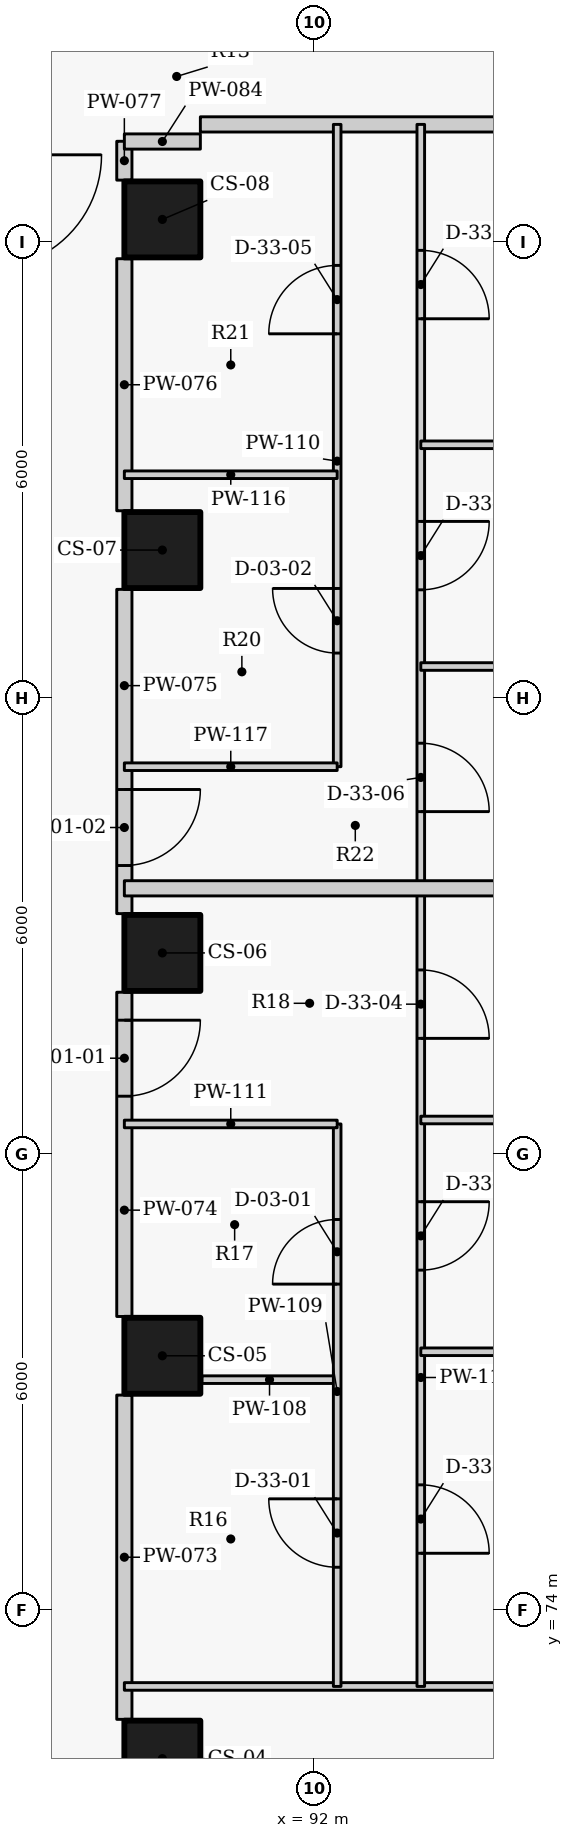
"""IFC4 building model, lengths in metres.
Left out: names, types, materials, properties, quantities, classifications, styles, units other than length and angle.
Written with IfcOpenShell. Run it as: python <this file> out.ifc"""

import sys

from ifc_helpers import new_model, si_unit, direction, frame, frame_2d, origin, origin_2d, place, context, subcontext, project, spatial, rectangle, extrude, element, fill, save


model = new_model("IFC4")
c1 = context("Model", 3, precision=1e-05, world=origin(), true_north=direction((0.0, 1.0)))
c2 = subcontext(c1, "Body", "Model", "MODEL_VIEW")
j1 = project(units=[si_unit("LENGTHUNIT", "METRE"), si_unit("PLANEANGLEUNIT", "RADIAN")], contexts=[c1])
p1 = place(None, origin())
s1 = spatial("IfcSite", under=j1, at=p1, CompositionType="ELEMENT")
p2 = place(p1, origin())
s2 = spatial("IfcBuilding", under=s1, at=p2, CompositionType="ELEMENT")
p3 = place(p2, frame((0.0, 0.0, 77.7)))
s3 = spatial("IfcBuildingStorey", under=s2, at=p3, CompositionType="ELEMENT", Elevation=77.7)
for number, where, z_axis, x_axis in (
    (1, (90.0, 72.05, 0.0), (0.0, 0.0, 1.0), (0.0, 1.0, 0.0)),
    (2, (90.0, 77.35, 0.0), (0.0, 0.0, 1.0), (0.0, 1.0, 0.0)),
    (3, (90.0, 82.65, 0.0), (0.0, 0.0, 1.0), (0.0, 1.0, 0.0)),
    (4, (90.0, 87.95, 0.0), (0.0, 0.0, 1.0), (0.0, 1.0, 0.0)),
    (5, (90.0, 92.3, 0.0), (0.0, 0.0, 1.0), (0.0, 1.0, 0.0)),
):
    element("IfcColumn", number, at=place(p3, frame(where, z_axis=z_axis, x_axis=x_axis)), inside=s3, PredefinedType="COLUMN", context=c2, shape_type="SweptSolid", body=[
        extrude(rectangle(XDim=1.0, YDim=1.0, at=origin_2d()), origin(), (0.0, 0.0, 1.0), 3.3),
    ])
p4 = place(p3, frame((89.5, 72.567, 0.0), z_axis=(0.0, 0.0, 1.0), x_axis=(0.0, 1.0, 0.0)))
e6 = element("IfcWall", 6, at=p4, inside=s3, PredefinedType="PARTITIONING", context=c2, shape_type="SweptSolid", body=[
    extrude(rectangle(XDim=4.266, YDim=0.2, at=frame_2d((2.133, 0.0))), origin(), (0.0, 0.0, 1.0), 3.025),
])
p5 = place(p3, frame((89.5, 82.133, 0.0), z_axis=(0.0, 0.0, 1.0), x_axis=(0.0, -1.0, 0.0)))
e7 = element("IfcWall", 7, at=p5, inside=s3, PredefinedType="PARTITIONING", context=c2, shape_type="SweptSolid", body=[
    extrude(rectangle(XDim=4.266, YDim=0.2, at=frame_2d((2.133, 0.0))), origin(), (0.0, 0.0, 1.0), 3.025),
])
p6 = place(p5, frame((0.368, 0.0, 0.0)))
e8 = element("IfcOpeningElement", 8, at=p6, cuts=e7, PredefinedType="OPENING", context=c2, shape_type="SweptSolid", body=[
    extrude(rectangle(XDim=1.0, YDim=2.1, at=frame_2d((0.5, 1.05))), frame((0.0, 0.11, 0.0), z_axis=(0.0, -1.0, 0.0), x_axis=(1.0, 0.0, 0.0)), (0.0, 0.0, 1.0), 0.22),
])
p7 = place(p3, frame((89.5, 87.433, 0.0), z_axis=(0.0, 0.0, 1.0), x_axis=(0.0, -1.0, 0.0)))
e9 = element("IfcWall", 9, at=p7, inside=s3, PredefinedType="PARTITIONING", context=c2, shape_type="SweptSolid", body=[
    extrude(rectangle(XDim=4.266, YDim=0.2, at=frame_2d((2.133, 0.0))), origin(), (0.0, 0.0, 1.0), 3.025),
])
p8 = place(p7, frame((2.633, 0.0, 0.0)))
e10 = element("IfcOpeningElement", 10, at=p8, cuts=e9, PredefinedType="OPENING", context=c2, shape_type="SweptSolid", body=[
    extrude(rectangle(XDim=1.0, YDim=2.1, at=frame_2d((0.5, 1.05))), frame((0.0, 0.11, 0.0), z_axis=(0.0, -1.0, 0.0), x_axis=(1.0, 0.0, 0.0)), (0.0, 0.0, 1.0), 0.22),
])
p9 = place(p3, frame((89.5, 88.467, 0.0), z_axis=(0.0, 0.0, 1.0), x_axis=(0.0, 1.0, 0.0)))
e11 = element("IfcWall", 11, at=p9, inside=s3, PredefinedType="PARTITIONING", context=c2, shape_type="SweptSolid", body=[
    extrude(rectangle(XDim=3.316, YDim=0.2, at=frame_2d((1.658, 0.0))), origin(), (0.0, 0.0, 1.0), 3.025),
])
p10 = place(p3, frame((89.5, 92.817, 0.0), z_axis=(0.0, 0.0, 1.0), x_axis=(0.0, 1.0, 0.0)))
e12 = element("IfcWall", 12, at=p10, inside=s3, PredefinedType="PARTITIONING", context=c2, shape_type="SweptSolid", body=[
    extrude(rectangle(XDim=0.511, YDim=0.2, at=frame_2d((0.255, 0.0))), origin(), (0.0, 0.0, 1.0), 3.025),
])
p11 = place(p3, frame((90.5, 93.55, 0.0), z_axis=(0.0, 0.0, 1.0), x_axis=(1.0, 0.0, 0.0)))
e13 = element("IfcWall", 13, at=p11, inside=s3, PredefinedType="PARTITIONING", context=c2, shape_type="SweptSolid", body=[
    extrude(rectangle(XDim=9.043, YDim=0.2, at=frame_2d((4.521, 0.0))), origin(), (0.0, 0.0, 1.0), 2.405),
])
p12 = place(p3, frame((89.5, 93.325, 0.0), z_axis=(0.0, 0.0, 1.0), x_axis=(1.0, 0.0, 0.0)))
e14 = element("IfcWall", 14, at=p12, inside=s3, PredefinedType="PARTITIONING", context=c2, shape_type="SweptSolid", body=[
    extrude(rectangle(XDim=1.0, YDim=0.2, at=frame_2d((0.5, 0.0))), origin(), (0.0, 0.0, 1.0), 2.505),
])
p13 = place(p3, frame((89.5, 73.0, 0.0), z_axis=(0.0, 0.0, 1.0), x_axis=(1.0, 0.0, 0.0)))
e15 = element("IfcWall", 15, at=p13, inside=s3, PredefinedType="PARTITIONING", context=c2, shape_type="SweptSolid", body=[
    extrude(rectangle(XDim=13.109, YDim=0.1, at=frame_2d((6.555, 0.0))), origin(), (0.0, 0.0, 1.0), 2.505),
])
p14 = place(p3, frame((90.52, 77.036, 0.0), z_axis=(0.0, 0.0, 1.0), x_axis=(1.0, 0.0, 0.0)))
e16 = element("IfcWall", 16, at=p14, inside=s3, PredefinedType="PARTITIONING", context=c2, shape_type="SweptSolid", body=[
    extrude(rectangle(XDim=1.78, YDim=0.1, at=frame_2d((0.89, 0.0))), origin(), (0.0, 0.0, 1.0), 3.025),
])
p15 = place(p3, frame((92.3, 73.0, 0.0), z_axis=(0.0, 0.0, 1.0), x_axis=(0.0, 1.0, 0.0)))
e17 = element("IfcWall", 17, at=p15, inside=s3, PredefinedType="PARTITIONING", context=c2, shape_type="SweptSolid", body=[
    extrude(rectangle(XDim=7.4, YDim=0.1, at=frame_2d((3.7, 0.0))), origin(), (0.0, 0.0, 1.0), 3.025),
])
p16 = place(p15, frame((1.568, 0.0, 0.0)))
e18 = element("IfcOpeningElement", 18, at=p16, cuts=e17, PredefinedType="OPENING", context=c2, shape_type="SweptSolid", body=[
    extrude(rectangle(XDim=0.9, YDim=2.1, at=frame_2d((0.45, 1.05))), frame((0.0, 0.06, 0.0), z_axis=(0.0, -1.0, 0.0), x_axis=(1.0, 0.0, 0.0)), (0.0, 0.0, 1.0), 0.12),
])
p17 = place(p15, frame((5.293, 0.0, 0.0)))
e19 = element("IfcOpeningElement", 19, at=p17, cuts=e17, PredefinedType="OPENING", context=c2, shape_type="SweptSolid", body=[
    extrude(rectangle(XDim=0.85, YDim=2.1, at=frame_2d((0.425, 1.05))), frame((0.0, 0.06, 0.0), z_axis=(0.0, -1.0, 0.0), x_axis=(1.0, 0.0, 0.0)), (0.0, 0.0, 1.0), 0.12),
])
p18 = place(p3, frame((92.3, 85.1, 0.0), z_axis=(0.0, 0.0, 1.0), x_axis=(0.0, 1.0, 0.0)))
e20 = element("IfcWall", 20, at=p18, inside=s3, PredefinedType="PARTITIONING", context=c2, shape_type="SweptSolid", body=[
    extrude(rectangle(XDim=8.45, YDim=0.1, at=frame_2d((4.225, 0.0))), origin(), (0.0, 0.0, 1.0), 3.025),
])
p19 = place(p18, frame((1.495, 0.0, 0.0)))
e21 = element("IfcOpeningElement", 21, at=p19, cuts=e20, PredefinedType="OPENING", context=c2, shape_type="SweptSolid", body=[
    extrude(rectangle(XDim=0.85, YDim=2.1, at=frame_2d((0.425, 1.05))), frame((0.0, 0.06, 0.0), z_axis=(0.0, -1.0, 0.0), x_axis=(1.0, 0.0, 0.0)), (0.0, 0.0, 1.0), 0.12),
])
p20 = place(p18, frame((5.695, 0.0, 0.0)))
e22 = element("IfcOpeningElement", 22, at=p20, cuts=e20, PredefinedType="OPENING", context=c2, shape_type="SweptSolid", body=[
    extrude(rectangle(XDim=0.9, YDim=2.1, at=frame_2d((0.45, 1.05))), frame((0.0, 0.06, 0.0), z_axis=(0.0, -1.0, 0.0), x_axis=(1.0, 0.0, 0.0)), (0.0, 0.0, 1.0), 0.12),
])
p21 = place(p3, frame((89.5, 80.4, 0.0), z_axis=(0.0, 0.0, 1.0), x_axis=(1.0, 0.0, 0.0)))
e23 = element("IfcWall", 23, at=p21, inside=s3, PredefinedType="PARTITIONING", context=c2, shape_type="SweptSolid", body=[
    extrude(rectangle(XDim=2.8, YDim=0.1, at=frame_2d((1.4, 0.0))), origin(), (0.0, 0.0, 1.0), 2.505),
])
p22 = place(p3, frame((93.4, 93.55, 0.0), z_axis=(0.0, 0.0, 1.0), x_axis=(0.0, -1.0, 0.0)))
e24 = element("IfcWall", 24, at=p22, inside=s3, PredefinedType="PARTITIONING", context=c2, shape_type="SweptSolid", body=[
    extrude(rectangle(XDim=20.55, YDim=0.1, at=frame_2d((10.275, 0.0))), origin(), (0.0, 0.0, 1.0), 3.025),
])
p23 = place(p22, frame((17.898, 0.0, 0.0)))
e25 = element("IfcOpeningElement", 25, at=p23, cuts=e24, PredefinedType="OPENING", context=c2, shape_type="SweptSolid", body=[
    extrude(rectangle(XDim=0.9, YDim=2.1, at=frame_2d((0.45, 1.05))), frame((0.0, 0.06, 0.0), z_axis=(0.0, -1.0, 0.0), x_axis=(1.0, 0.0, 0.0)), (0.0, 0.0, 1.0), 0.12),
])
p24 = place(p22, frame((14.173, 0.0, 0.0)))
e26 = element("IfcOpeningElement", 26, at=p24, cuts=e24, PredefinedType="OPENING", context=c2, shape_type="SweptSolid", body=[
    extrude(rectangle(XDim=0.9, YDim=2.1, at=frame_2d((0.45, 1.05))), frame((0.0, 0.06, 0.0), z_axis=(0.0, -1.0, 0.0), x_axis=(1.0, 0.0, 0.0)), (0.0, 0.0, 1.0), 0.12),
])
p25 = place(p22, frame((11.124, 0.0, 0.0)))
e27 = element("IfcOpeningElement", 27, at=p25, cuts=e24, PredefinedType="OPENING", context=c2, shape_type="SweptSolid", body=[
    extrude(rectangle(XDim=0.9, YDim=2.1, at=frame_2d((0.45, 1.05))), frame((0.0, 0.06, 0.0), z_axis=(0.0, -1.0, 0.0), x_axis=(1.0, 0.0, 0.0)), (0.0, 0.0, 1.0), 0.12),
])
p26 = place(p22, frame((8.141, 0.0, 0.0)))
e28 = element("IfcOpeningElement", 28, at=p26, cuts=e24, PredefinedType="OPENING", context=c2, shape_type="SweptSolid", body=[
    extrude(rectangle(XDim=0.9, YDim=2.1, at=frame_2d((0.45, 1.05))), frame((0.0, 0.06, 0.0), z_axis=(0.0, -1.0, 0.0), x_axis=(1.0, 0.0, 0.0)), (0.0, 0.0, 1.0), 0.12),
])
p27 = place(p22, frame((5.223, 0.0, 0.0)))
e29 = element("IfcOpeningElement", 29, at=p27, cuts=e24, PredefinedType="OPENING", context=c2, shape_type="SweptSolid", body=[
    extrude(rectangle(XDim=0.9, YDim=2.1, at=frame_2d((0.45, 1.05))), frame((0.0, 0.06, 0.0), z_axis=(0.0, -1.0, 0.0), x_axis=(1.0, 0.0, 0.0)), (0.0, 0.0, 1.0), 0.12),
])
p28 = place(p22, frame((1.657, 0.0, 0.0)))
e30 = element("IfcOpeningElement", 30, at=p28, cuts=e24, PredefinedType="OPENING", context=c2, shape_type="SweptSolid", body=[
    extrude(rectangle(XDim=0.9, YDim=2.1, at=frame_2d((0.45, 1.05))), frame((0.0, 0.06, 0.0), z_axis=(0.0, -1.0, 0.0), x_axis=(1.0, 0.0, 0.0)), (0.0, 0.0, 1.0), 0.12),
])
p29 = place(p3, frame((89.5, 83.5, 0.0), z_axis=(0.0, 0.0, 1.0), x_axis=(1.0, 0.0, 0.0)))
e31 = element("IfcWall", 31, at=p29, inside=s3, PredefinedType="PARTITIONING", context=c2, shape_type="SweptSolid", body=[
    extrude(rectangle(XDim=15.846, YDim=0.2, at=frame_2d((7.923, 0.0))), origin(), (0.0, 0.0, 1.0), 2.405),
])
p30 = place(p3, frame((93.4, 77.403, 0.0), z_axis=(0.0, 0.0, 1.0), x_axis=(1.0, 0.0, 0.0)))
e32 = element("IfcWall", 32, at=p30, inside=s3, PredefinedType="PARTITIONING", context=c2, shape_type="SweptSolid", body=[
    extrude(rectangle(XDim=3.588, YDim=0.1, at=frame_2d((1.794, 0.0))), origin(), (0.0, 0.0, 1.0), 3.025),
])
p31 = place(p3, frame((93.4, 80.452, 0.0), z_axis=(0.0, 0.0, 1.0), x_axis=(1.0, 0.0, 0.0)))
e33 = element("IfcWall", 33, at=p31, inside=s3, PredefinedType="PARTITIONING", context=c2, shape_type="SweptSolid", body=[
    extrude(rectangle(XDim=4.208, YDim=0.1, at=frame_2d((2.104, 0.0))), origin(), (0.0, 0.0, 1.0), 2.405),
])
for number, where, z_axis, x_axis in (
    (34, (89.5, 88.941, 0.0), (0.0, 0.0, 1.0), (1.0, 0.0, 0.0)),
    (35, (89.5, 85.1, 0.0), (0.0, 0.0, 1.0), (1.0, 0.0, 0.0)),
):
    element("IfcWall", number, at=place(p3, frame(where, z_axis=z_axis, x_axis=x_axis)), inside=s3, PredefinedType="PARTITIONING", context=c2, shape_type="SweptSolid", body=[
        extrude(rectangle(XDim=2.8, YDim=0.1, at=frame_2d((1.4, 0.0))), origin(), (0.0, 0.0, 1.0), 2.505),
    ])
p32 = place(p3, frame((93.4, 86.418, 0.0), z_axis=(0.0, 0.0, 1.0), x_axis=(1.0, 0.0, 0.0)))
e36 = element("IfcWall", 36, at=p32, inside=s3, PredefinedType="PARTITIONING", context=c2, shape_type="SweptSolid", body=[
    extrude(rectangle(XDim=10.261, YDim=0.1, at=frame_2d((5.131, 0.0))), origin(), (0.0, 0.0, 1.0), 2.405),
])
p33 = place(p3, frame((93.4, 89.335, 0.0), z_axis=(0.0, 0.0, 1.0), x_axis=(1.0, 0.0, 0.0)))
e37 = element("IfcWall", 37, at=p33, inside=s3, PredefinedType="PARTITIONING", context=c2, shape_type="SweptSolid", body=[
    extrude(rectangle(XDim=8.577, YDim=0.1, at=frame_2d((4.288, 0.0))), origin(), (0.0, 0.0, 1.0), 2.405),
])
p34 = place(p6, origin())
e38 = element("IfcDoor", 38, at=p34, inside=s3, OperationType="SINGLE_SWING_LEFT", PredefinedType="DOOR", context=c2, shape_type="SweptSolid", body=[
    extrude(rectangle(XDim=1.0, YDim=2.1, at=frame_2d((0.5, 1.05))), frame((0.0, 0.025, 0.0), z_axis=(0.0, -1.0, 0.0), x_axis=(1.0, 0.0, 0.0)), (0.0, 0.0, 1.0), 0.05),
])
fill(e8, e38)
p35 = place(p16, origin())
e39 = element("IfcDoor", 39, at=p35, inside=s3, OperationType="SINGLE_SWING_RIGHT", PredefinedType="DOOR", context=c2, shape_type="SweptSolid", body=[
    extrude(rectangle(XDim=0.9, YDim=2.1, at=frame_2d((0.45, 1.05))), frame((0.0, 0.025, 0.0), z_axis=(0.0, -1.0, 0.0), x_axis=(1.0, 0.0, 0.0)), (0.0, 0.0, 1.0), 0.05),
])
fill(e18, e39)
p36 = place(p17, origin())
e40 = element("IfcDoor", 40, at=p36, inside=s3, OperationType="SINGLE_SWING_LEFT", PredefinedType="DOOR", context=c2, shape_type="SweptSolid", body=[
    extrude(rectangle(XDim=0.85, YDim=2.1, at=frame_2d((0.425, 1.05))), frame((0.0, 0.025, 0.0), z_axis=(0.0, -1.0, 0.0), x_axis=(1.0, 0.0, 0.0)), (0.0, 0.0, 1.0), 0.05),
])
fill(e19, e40)
p37 = place(p23, origin())
e41 = element("IfcDoor", 41, at=p37, inside=s3, OperationType="SINGLE_SWING_RIGHT", PredefinedType="DOOR", context=c2, shape_type="SweptSolid", body=[
    extrude(rectangle(XDim=0.9, YDim=2.1, at=frame_2d((0.45, 1.05))), frame((0.0, 0.025, 0.0), z_axis=(0.0, -1.0, 0.0), x_axis=(1.0, 0.0, 0.0)), (0.0, 0.0, 1.0), 0.05),
])
fill(e25, e41)
p38 = place(p24, origin())
e42 = element("IfcDoor", 42, at=p38, inside=s3, OperationType="SINGLE_SWING_LEFT", PredefinedType="DOOR", context=c2, shape_type="SweptSolid", body=[
    extrude(rectangle(XDim=0.9, YDim=2.1, at=frame_2d((0.45, 1.05))), frame((0.0, 0.025, 0.0), z_axis=(0.0, -1.0, 0.0), x_axis=(1.0, 0.0, 0.0)), (0.0, 0.0, 1.0), 0.05),
])
fill(e26, e42)
p39 = place(p25, origin())
e43 = element("IfcDoor", 43, at=p39, inside=s3, OperationType="SINGLE_SWING_RIGHT", PredefinedType="DOOR", context=c2, shape_type="SweptSolid", body=[
    extrude(rectangle(XDim=0.9, YDim=2.1, at=frame_2d((0.45, 1.05))), frame((0.0, 0.025, 0.0), z_axis=(0.0, -1.0, 0.0), x_axis=(1.0, 0.0, 0.0)), (0.0, 0.0, 1.0), 0.05),
])
fill(e27, e43)
p40 = place(p8, origin())
e44 = element("IfcDoor", 44, at=p40, inside=s3, OperationType="SINGLE_SWING_LEFT", PredefinedType="DOOR", context=c2, shape_type="SweptSolid", body=[
    extrude(rectangle(XDim=1.0, YDim=2.1, at=frame_2d((0.5, 1.05))), frame((0.0, 0.025, 0.0), z_axis=(0.0, -1.0, 0.0), x_axis=(1.0, 0.0, 0.0)), (0.0, 0.0, 1.0), 0.05),
])
fill(e10, e44)
p41 = place(p19, origin())
e45 = element("IfcDoor", 45, at=p41, inside=s3, OperationType="SINGLE_SWING_RIGHT", PredefinedType="DOOR", context=c2, shape_type="SweptSolid", body=[
    extrude(rectangle(XDim=0.85, YDim=2.1, at=frame_2d((0.425, 1.05))), frame((0.0, 0.025, 0.0), z_axis=(0.0, -1.0, 0.0), x_axis=(1.0, 0.0, 0.0)), (0.0, 0.0, 1.0), 0.05),
])
fill(e21, e45)
p42 = place(p20, origin())
e46 = element("IfcDoor", 46, at=p42, inside=s3, OperationType="SINGLE_SWING_LEFT", PredefinedType="DOOR", context=c2, shape_type="SweptSolid", body=[
    extrude(rectangle(XDim=0.9, YDim=2.1, at=frame_2d((0.45, 1.05))), frame((0.0, 0.025, 0.0), z_axis=(0.0, -1.0, 0.0), x_axis=(1.0, 0.0, 0.0)), (0.0, 0.0, 1.0), 0.05),
])
fill(e22, e46)
p43 = place(p26, origin())
e47 = element("IfcDoor", 47, at=p43, inside=s3, OperationType="SINGLE_SWING_RIGHT", PredefinedType="DOOR", context=c2, shape_type="SweptSolid", body=[
    extrude(rectangle(XDim=0.9, YDim=2.1, at=frame_2d((0.45, 1.05))), frame((0.0, 0.025, 0.0), z_axis=(0.0, -1.0, 0.0), x_axis=(1.0, 0.0, 0.0)), (0.0, 0.0, 1.0), 0.05),
])
fill(e28, e47)
p44 = place(p27, origin())
e48 = element("IfcDoor", 48, at=p44, inside=s3, OperationType="SINGLE_SWING_LEFT", PredefinedType="DOOR", context=c2, shape_type="SweptSolid", body=[
    extrude(rectangle(XDim=0.9, YDim=2.1, at=frame_2d((0.45, 1.05))), frame((0.0, 0.025, 0.0), z_axis=(0.0, -1.0, 0.0), x_axis=(1.0, 0.0, 0.0)), (0.0, 0.0, 1.0), 0.05),
])
fill(e29, e48)
p45 = place(p28, origin())
e49 = element("IfcDoor", 49, at=p45, inside=s3, OperationType="SINGLE_SWING_RIGHT", PredefinedType="DOOR", context=c2, shape_type="SweptSolid", body=[
    extrude(rectangle(XDim=0.9, YDim=2.1, at=frame_2d((0.45, 1.05))), frame((0.0, 0.025, 0.0), z_axis=(0.0, -1.0, 0.0), x_axis=(1.0, 0.0, 0.0)), (0.0, 0.0, 1.0), 0.05),
])
fill(e30, e49)
save(model, sys.argv[1])
